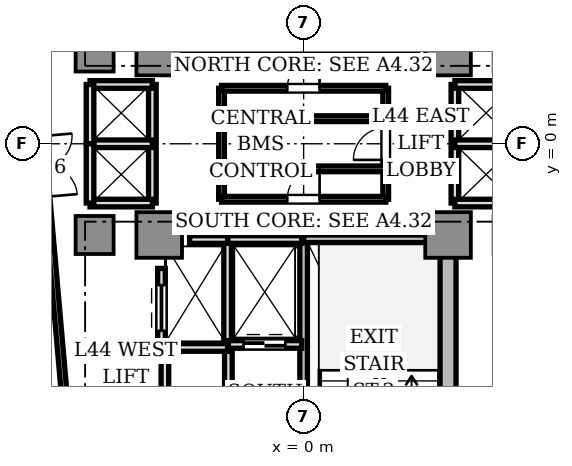
"""IFC4 building model, lengths in metres.
Left out: names, types, materials, properties, quantities, classifications, styles, units other than length and angle.
Written with IfcOpenShell. Run it as: python <this file> out.ifc"""

import sys

from ifc_helpers import new_model, si_unit, direction, frame, frame_2d, origin, origin_2d, place, context, subcontext, project, spatial, rectangle, extrude, source, transform, mapped, element, fill, save


model = new_model("IFC4")
c1 = context("Model", 3, precision=1e-05, world=origin(), true_north=direction((0.0, 1.0)))
c2 = subcontext(c1, "Body", "Model", "MODEL_VIEW")
j1 = project(units=[si_unit("LENGTHUNIT", "METRE"), si_unit("PLANEANGLEUNIT", "RADIAN")], contexts=[c1])
p1 = place(None, origin())
s1 = spatial("IfcSite", under=j1, at=p1, CompositionType="ELEMENT")
p2 = place(p1, origin())
s2 = spatial("IfcBuilding", under=s1, at=p2, CompositionType="ELEMENT")
p3 = place(p2, frame((0.0, 0.0, 160.65)))
s3 = spatial("IfcBuildingStorey", under=s2, at=p3, CompositionType="ELEMENT", Elevation=160.65)
p4 = place(p3, frame((3.8, -9.75, 0.0), z_axis=(0.0, 0.0, 1.0), x_axis=(0.0, 1.0, 0.0)))
e1 = element("IfcWall", 1, at=p4, inside=s3, PredefinedType="SHEAR", context=c2, shape_type="SweptSolid", body=[
    extrude(rectangle(XDim=6.9, YDim=0.42, at=frame_2d((3.45, 0.0))), origin(), (0.0, 0.0, 1.0), 3.11),
])
m1 = source(origin(), c2, "Body", "SweptSolid", [
    extrude(rectangle(XDim=1.2, YDim=1.2, at=origin_2d()), origin(), (0.0, 0.0, 1.0), 3.11),
])
for number, where, z_axis, x_axis in (
    (2, (-3.8, 2.4, 0.0), (0.0, 0.0, 1.0), (1.0, 0.0, 0.0)),
    (3, (3.8, 2.4, 0.0), (0.0, 0.0, 1.0), (1.0, 0.0, 0.0)),
    (4, (-3.8, -2.4, 0.0), (0.0, 0.0, 1.0), (1.0, 0.0, 0.0)),
    (5, (3.8, -2.4, 0.0), (0.0, 0.0, 1.0), (1.0, 0.0, 0.0)),
):
    element("IfcColumn", number, at=place(p3, frame(where, z_axis=z_axis, x_axis=x_axis)), inside=s3, PredefinedType="COLUMN", context=c2, shape_type="MappedRepresentation", body=[
        mapped(m1, transform((0.0, 0.0, 0.0), scale=1.0)),
    ])
m2 = source(origin(), c2, "Body", "SweptSolid", [
    extrude(rectangle(XDim=1.0, YDim=1.0, at=origin_2d()), origin(), (0.0, 0.0, 1.0), 3.11),
])
for number, where, z_axis, x_axis in (
    (6, (-5.5, 2.4, 0.0), (0.0, 0.0, 1.0), (1.0, 0.0, 0.0)),
    (7, (-5.5, -2.4, 0.0), (0.0, 0.0, 1.0), (1.0, 0.0, 0.0)),
):
    element("IfcColumn", number, at=place(p3, frame(where, z_axis=z_axis, x_axis=x_axis)), inside=s3, PredefinedType="COLUMN", context=c2, shape_type="MappedRepresentation", body=[
        mapped(m2, transform((0.0, 0.0, 0.0), scale=1.0)),
    ])
p5 = place(p3, frame((0.0, -10.18, 0.0), z_axis=(0.0, 0.0, 1.0), x_axis=(0.0, 1.0, 0.0)))
e8 = element("IfcWall", 8, at=p5, inside=s3, PredefinedType="SOLIDWALL", context=c2, shape_type="SweptSolid", body=[
    extrude(rectangle(XDim=7.68, YDim=0.2, at=frame_2d((3.84, 0.0))), origin(), (0.0, 0.0, 1.0), 3.11),
])
p6 = place(p5, frame((0.28, 0.0, 0.0)))
e9 = element("IfcOpeningElement", 9, at=p6, cuts=e8, PredefinedType="OPENING", context=c2, shape_type="SweptSolid", body=[
    extrude(rectangle(XDim=1.1, YDim=2.15, at=frame_2d((0.55, 1.075))), frame((0.0, 0.11, 0.0), z_axis=(0.0, -1.0, 0.0), x_axis=(1.0, 0.0, 0.0)), (0.0, 0.0, 1.0), 0.22),
])
p7 = place(p3, frame((0.0, -2.5, 0.0), z_axis=(0.0, 0.0, 1.0), x_axis=(1.0, 0.0, 0.0)))
e10 = element("IfcWall", 10, at=p7, inside=s3, PredefinedType="SOLIDWALL", context=c2, shape_type="SweptSolid", body=[
    extrude(rectangle(XDim=3.72, YDim=0.2, at=frame_2d((1.86, 0.0))), origin(), (0.0, 0.0, 1.0), 3.11),
])
p8 = place(p3, frame((-1.98, -9.98, 0.0), z_axis=(0.0, 0.0, 1.0), x_axis=(0.0, 1.0, 0.0)))
e11 = element("IfcWall", 11, at=p8, inside=s3, PredefinedType="SOLIDWALL", context=c2, shape_type="SweptSolid", body=[
    extrude(rectangle(XDim=4.66, YDim=0.2, at=frame_2d((2.33, 0.0))), origin(), (0.0, 0.0, 1.0), 2.66),
])
p9 = place(p8, frame((0.2, 0.0, 0.0)))
e12 = element("IfcOpeningElement", 12, at=p9, cuts=e11, PredefinedType="OPENING", context=c2, shape_type="SweptSolid", body=[
    extrude(rectangle(XDim=0.85, YDim=2.1, at=frame_2d((0.425, 1.05))), frame((0.0, 0.11, 0.0), z_axis=(0.0, -1.0, 0.0), x_axis=(1.0, 0.0, 0.0)), (0.0, 0.0, 1.0), 0.22),
])
p10 = place(p3, frame((-2.0, -5.28, 0.0), z_axis=(0.0, 0.0, 1.0), x_axis=(0.0, 1.0, 0.0)))
e13 = element("IfcWall", 13, at=p10, inside=s3, PredefinedType="SOLIDWALL", context=c2, shape_type="SweptSolid", body=[
    extrude(rectangle(XDim=2.78, YDim=0.2, at=frame_2d((1.39, 0.0))), origin(), (0.0, 0.0, 1.0), 2.66),
])
p11 = place(p3, frame((-2.0, -2.52, 0.0), z_axis=(0.0, 0.0, 1.0), x_axis=(1.0, 0.0, 0.0)))
e14 = element("IfcWall", 14, at=p11, inside=s3, PredefinedType="SOLIDWALL", context=c2, shape_type="SweptSolid", body=[
    extrude(rectangle(XDim=1.95, YDim=0.2, at=frame_2d((0.975, 0.0))), origin(), (0.0, 0.0, 1.0), 2.66),
])
p12 = place(p3, frame((-1.98, -5.28, 0.0), z_axis=(0.0, 0.0, 1.0), x_axis=(1.0, 0.0, 0.0)))
e15 = element("IfcWall", 15, at=p12, inside=s3, PredefinedType="SOLIDWALL", context=c2, shape_type="SweptSolid", body=[
    extrude(rectangle(XDim=1.93, YDim=0.2, at=frame_2d((0.965, 0.0))), origin(), (0.0, 0.0, 1.0), 2.66),
])
p13 = place(p12, frame((0.4, 0.0, 0.0)))
e16 = element("IfcOpeningElement", 16, at=p13, cuts=e15, PredefinedType="OPENING", context=c2, shape_type="SweptSolid", body=[
    extrude(rectangle(XDim=1.1, YDim=2.2, at=frame_2d((0.55, 1.1))), frame((0.0, 0.11, 0.0), z_axis=(0.0, -1.0, 0.0), x_axis=(1.0, 0.0, 0.0)), (0.0, 0.0, 1.0), 0.22),
])
p14 = place(p3, frame((-3.0, -2.52, 0.0), z_axis=(0.0, 0.0, 1.0), x_axis=(1.0, 0.0, 0.0)))
e17 = element("IfcWall", 17, at=p14, inside=s3, PredefinedType="SOLIDWALL", context=c2, shape_type="SweptSolid", body=[
    extrude(rectangle(XDim=1.0, YDim=0.2, at=frame_2d((0.5, 0.0))), origin(), (0.0, 0.0, 1.0), 2.66),
])
p15 = place(p3, frame((-3.74, -5.36, 0.0), z_axis=(0.0, 0.0, 1.0), x_axis=(1.0, 0.0, 0.0)))
e18 = element("IfcWall", 18, at=p15, inside=s3, PredefinedType="SOLIDWALL", context=c2, shape_type="SweptSolid", body=[
    extrude(rectangle(XDim=1.74, YDim=0.2, at=frame_2d((0.87, 0.0))), origin(), (0.0, 0.0, 1.0), 2.66),
])
p16 = place(p3, frame((-3.74, -5.36, 0.0), z_axis=(0.0, 0.0, 1.0), x_axis=(0.0, 1.0, 0.0)))
e19 = element("IfcWall", 19, at=p16, inside=s3, PredefinedType="SOLIDWALL", context=c2, shape_type="SweptSolid", body=[
    extrude(rectangle(XDim=2.08, YDim=0.2, at=frame_2d((1.04, 0.0))), origin(), (0.0, 0.0, 1.0), 2.66),
])
p17 = place(p16, frame((0.44, 0.0, 0.0)))
e20 = element("IfcOpeningElement", 20, at=p17, cuts=e19, PredefinedType="OPENING", context=c2, shape_type="SweptSolid", body=[
    extrude(rectangle(XDim=1.2, YDim=2.2, at=frame_2d((0.6, 1.1))), frame((0.0, 0.11, 0.0), z_axis=(0.0, -1.0, 0.0), x_axis=(1.0, 0.0, 0.0)), (0.0, 0.0, 1.0), 0.22),
])
p18 = place(p3, frame((3.98, -1.56, 0.0), z_axis=(0.0, 0.0, 1.0), x_axis=(0.0, 1.0, 0.0)))
e21 = element("IfcWall", 21, at=p18, inside=s3, PredefinedType="SOLIDWALL", context=c2, shape_type="SweptSolid", body=[
    extrude(rectangle(XDim=3.12, YDim=0.2, at=frame_2d((1.56, 0.0))), origin(), (0.0, 0.0, 1.0), 2.28),
])
for number, where, z_axis, x_axis in (
    (22, (3.98, 1.56, 0.0), (0.0, 0.0, 1.0), (1.0, 0.0, 0.0)),
    (23, (3.98, -1.56, 0.0), (0.0, 0.0, 1.0), (1.0, 0.0, 0.0)),
    (24, (3.98, 0.0, 0.0), (0.0, 0.0, 1.0), (1.0, 0.0, 0.0)),
):
    element("IfcWall", number, at=place(p3, frame(where, z_axis=z_axis, x_axis=x_axis)), inside=s3, PredefinedType="SOLIDWALL", context=c2, shape_type="SweptSolid", body=[
        extrude(rectangle(XDim=1.64, YDim=0.2, at=frame_2d((0.82, 0.0))), origin(), (0.0, 0.0, 1.0), 2.66),
    ])
p19 = place(p3, frame((-3.98, -1.56, 0.0), z_axis=(0.0, 0.0, 1.0), x_axis=(0.0, 1.0, 0.0)))
e25 = element("IfcWall", 25, at=p19, inside=s3, PredefinedType="SOLIDWALL", context=c2, shape_type="SweptSolid", body=[
    extrude(rectangle(XDim=3.12, YDim=0.2, at=frame_2d((1.56, 0.0))), origin(), (0.0, 0.0, 1.0), 2.28),
])
for number, where, z_axis, x_axis in (
    (26, (-5.62, 1.56, 0.0), (0.0, 0.0, 1.0), (1.0, 0.0, 0.0)),
    (27, (-5.62, -1.56, 0.0), (0.0, 0.0, 1.0), (1.0, 0.0, 0.0)),
    (28, (-5.62, 0.0, 0.0), (0.0, 0.0, 1.0), (1.0, 0.0, 0.0)),
):
    element("IfcWall", number, at=place(p3, frame(where, z_axis=z_axis, x_axis=x_axis)), inside=s3, PredefinedType="SOLIDWALL", context=c2, shape_type="SweptSolid", body=[
        extrude(rectangle(XDim=1.64, YDim=0.2, at=frame_2d((0.82, 0.0))), origin(), (0.0, 0.0, 1.0), 2.66),
    ])
for number, where, z_axis, x_axis in (
    (29, (-5.62, 0.0, 0.0), (0.0, 0.0, 1.0), (0.0, 1.0, 0.0)),
    (30, (-5.62, -1.56, 0.0), (0.0, 0.0, 1.0), (0.0, 1.0, 0.0)),
):
    element("IfcWall", number, at=place(p3, frame(where, z_axis=z_axis, x_axis=x_axis)), inside=s3, PredefinedType="SOLIDWALL", context=c2, shape_type="SweptSolid", body=[
        extrude(rectangle(XDim=1.56, YDim=0.2, at=frame_2d((0.78, 0.0))), origin(), (0.0, 0.0, 1.0), 2.66),
    ])
p20 = place(p3, frame((-3.65, -8.81, 0.0), z_axis=(0.0, 0.0, 1.0), x_axis=(0.0, 1.0, 0.0)))
e31 = element("IfcWall", 31, at=p20, inside=s3, PredefinedType="SOLIDWALL", context=c2, shape_type="SweptSolid", body=[
    extrude(rectangle(XDim=3.43, YDim=0.2, at=frame_2d((1.715, 0.0))), origin(), (0.0, 0.0, 1.0), 2.66),
])
p21 = place(p20, frame((1.2, 0.0, 0.0)))
e32 = element("IfcOpeningElement", 32, at=p21, cuts=e31, PredefinedType="OPENING", context=c2, shape_type="SweptSolid", body=[
    extrude(rectangle(XDim=0.95, YDim=2.15, at=frame_2d((0.475, 1.075))), frame((0.0, 0.11, 0.0), z_axis=(0.0, -1.0, 0.0), x_axis=(1.0, 0.0, 0.0)), (0.0, 0.0, 1.0), 0.22),
])
p22 = place(p3, frame((2.16, -1.46, 0.0), z_axis=(0.0, 0.0, 1.0), x_axis=(0.0, 1.0, 0.0)))
e33 = element("IfcWall", 33, at=p22, inside=s3, PredefinedType="PARTITIONING", context=c2, shape_type="SweptSolid", body=[
    extrude(rectangle(XDim=2.92, YDim=0.15, at=frame_2d((1.46, 0.0))), origin(), (0.0, 0.0, 1.0), 2.66),
])
p23 = place(p22, frame((1.035, 0.0, 0.0)))
e34 = element("IfcOpeningElement", 34, at=p23, cuts=e33, PredefinedType="OPENING", context=c2, shape_type="SweptSolid", body=[
    extrude(rectangle(XDim=0.85, YDim=2.1, at=frame_2d((0.425, 1.05))), frame((0.0, 0.085, 0.0), z_axis=(0.0, -1.0, 0.0), x_axis=(1.0, 0.0, 0.0)), (0.0, 0.0, 1.0), 0.17),
])
p24 = place(p3, frame((-2.16, -1.46, 0.0), z_axis=(0.0, 0.0, 1.0), x_axis=(0.0, 1.0, 0.0)))
e35 = element("IfcWall", 35, at=p24, inside=s3, PredefinedType="PARTITIONING", context=c2, shape_type="SweptSolid", body=[
    extrude(rectangle(XDim=2.92, YDim=0.15, at=frame_2d((1.46, 0.0))), origin(), (0.0, 0.0, 1.0), 2.66),
])
p25 = place(p3, frame((-2.16, 1.46, 0.0), z_axis=(0.0, 0.0, 1.0), x_axis=(1.0, 0.0, 0.0)))
e36 = element("IfcWall", 36, at=p25, inside=s3, PredefinedType="PARTITIONING", context=c2, shape_type="SweptSolid", body=[
    extrude(rectangle(XDim=4.32, YDim=0.15, at=frame_2d((2.16, 0.0))), origin(), (0.0, 0.0, 1.0), 2.66),
])
p26 = place(p25, frame((1.73, 0.0, 0.0)))
e37 = element("IfcOpeningElement", 37, at=p26, cuts=e36, PredefinedType="OPENING", context=c2, shape_type="SweptSolid", body=[
    extrude(rectangle(XDim=0.85, YDim=2.1, at=frame_2d((0.425, 1.05))), frame((0.0, 0.085, 0.0), z_axis=(0.0, -1.0, 0.0), x_axis=(1.0, 0.0, 0.0)), (0.0, 0.0, 1.0), 0.17),
])
p27 = place(p3, frame((-2.16, -1.46, 0.0), z_axis=(0.0, 0.0, 1.0), x_axis=(1.0, 0.0, 0.0)))
e38 = element("IfcWall", 38, at=p27, inside=s3, PredefinedType="PARTITIONING", context=c2, shape_type="SweptSolid", body=[
    extrude(rectangle(XDim=4.32, YDim=0.15, at=frame_2d((2.16, 0.0))), origin(), (0.0, 0.0, 1.0), 2.66),
])
p28 = place(p27, frame((1.73, 0.0, 0.0)))
e39 = element("IfcOpeningElement", 39, at=p28, cuts=e38, PredefinedType="OPENING", context=c2, shape_type="SweptSolid", body=[
    extrude(rectangle(XDim=0.85, YDim=2.1, at=frame_2d((0.425, 1.05))), frame((0.0, 0.085, 0.0), z_axis=(0.0, -1.0, 0.0), x_axis=(1.0, 0.0, 0.0)), (0.0, 0.0, 1.0), 0.17),
])
for number, where, z_axis, x_axis in (
    (40, (-2.16, 0.66, 0.0), (0.0, 0.0, 1.0), (1.0, 0.0, 0.0)),
    (41, (-2.16, -0.66, 0.0), (0.0, 0.0, 1.0), (1.0, 0.0, 0.0)),
):
    element("IfcWall", number, at=place(p3, frame(where, z_axis=z_axis, x_axis=x_axis)), inside=s3, PredefinedType="PARTITIONING", context=c2, shape_type="SweptSolid", body=[
        extrude(rectangle(XDim=4.32, YDim=0.15, at=frame_2d((2.16, 0.0))), origin(), (0.0, 0.0, 1.0), 2.66),
    ])
p29 = place(p3, frame((-7.373, 5.679, 0.0), z_axis=(0.0, 0.0, 1.0), x_axis=(0.087154691724, -0.996194790044, 0.0)))
e42 = element("IfcWall", 42, at=p29, inside=s3, PredefinedType="PARTITIONING", context=c2, shape_type="SweptSolid", body=[
    extrude(rectangle(XDim=12.6, YDim=0.15, at=frame_2d((6.3, 0.0))), origin(), (0.0, 0.0, 1.0), 2.66),
])
p30 = place(p29, frame((5.5, 0.0, 0.0)))
e43 = element("IfcOpeningElement", 43, at=p30, cuts=e42, PredefinedType="OPENING", context=c2, shape_type="SweptSolid", body=[
    extrude(rectangle(XDim=1.6, YDim=2.25, at=frame_2d((0.8, 1.125))), frame((0.0, 0.085, 0.0), z_axis=(0.0, -1.0, 0.0), x_axis=(1.0, 0.0, 0.0)), (0.0, 0.0, 1.0), 0.17),
])
m3 = source(origin(), c2, "Body", "SweptSolid", [
    extrude(rectangle(XDim=1.1, YDim=0.05, at=origin_2d()), origin(), (0.0, 0.0, 1.0), 2.2),
])
p31 = place(p13, frame((0.55, 0.0, 0.0)))
e44 = element("IfcDoor", 44, at=p31, inside=s3, OperationType="DOUBLE_DOOR_SLIDING", PredefinedType="DOOR", context=c2, shape_type="MappedRepresentation", body=[
    mapped(m3, transform((0.0, 0.0, 0.0), scale=1.0)),
])
fill(e16, e44)
m4 = source(origin(), c2, "Body", "SweptSolid", [
    extrude(rectangle(XDim=1.2, YDim=0.05, at=origin_2d()), origin(), (0.0, 0.0, 1.0), 2.2),
])
p32 = place(p17, frame((0.6, 0.0, 0.0)))
e45 = element("IfcDoor", 45, at=p32, inside=s3, OperationType="DOUBLE_DOOR_SLIDING", PredefinedType="DOOR", context=c2, shape_type="MappedRepresentation", body=[
    mapped(m4, transform((0.0, 0.0, 0.0), scale=1.0)),
])
fill(e20, e45)
m5 = source(origin(), c2, "Body", "SweptSolid", [
    extrude(rectangle(XDim=0.85, YDim=0.05, at=origin_2d()), origin(), (0.0, 0.0, 1.0), 2.1),
])
p33 = place(p26, frame((0.425, 0.0, 0.0)))
e46 = element("IfcDoor", 46, at=p33, inside=s3, OperationType="SINGLE_SWING_RIGHT", PredefinedType="DOOR", context=c2, shape_type="MappedRepresentation", body=[
    mapped(m5, transform((0.0, 0.0, 0.0), scale=1.0)),
])
fill(e37, e46)
p34 = place(p23, frame((0.425, 0.0, 0.0)))
e47 = element("IfcDoor", 47, at=p34, inside=s3, OperationType="SINGLE_SWING_LEFT", PredefinedType="DOOR", context=c2, shape_type="MappedRepresentation", body=[
    mapped(m5, transform((0.0, 0.0, 0.0), scale=1.0)),
])
fill(e34, e47)
p35 = place(p28, frame((0.425, 0.0, 0.0)))
e48 = element("IfcDoor", 48, at=p35, inside=s3, OperationType="SINGLE_SWING_RIGHT", PredefinedType="DOOR", context=c2, shape_type="MappedRepresentation", body=[
    mapped(m5, transform((0.0, 0.0, 0.0), scale=1.0)),
])
fill(e39, e48)
save(model, sys.argv[1])
